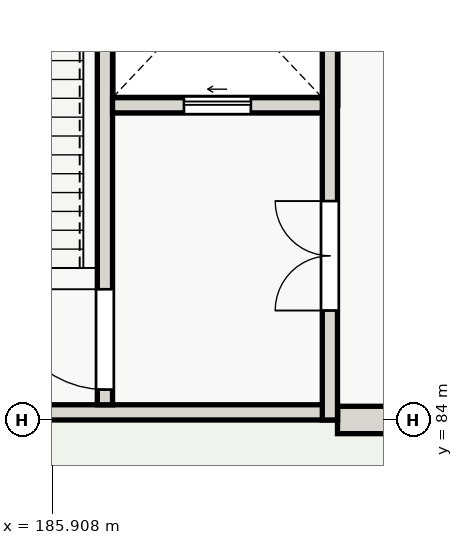
"""IFC4 building model, lengths in metres.
Left out: names, types, materials, properties, quantities, classifications, styles, units other than length and angle.
Written with IfcOpenShell. Run it as: python <this file> out.ifc"""

import sys

from ifc_helpers import new_model, si_unit, direction, frame, frame_2d, origin, place, context, subcontext, project, spatial, rectangle, extrude, element, fill, save


model = new_model("IFC4")
c1 = context("Model", 3, precision=1e-05, world=origin(), true_north=direction((0.0, 1.0)))
c2 = subcontext(c1, "Body", "Model", "MODEL_VIEW")
j1 = project(units=[si_unit("LENGTHUNIT", "METRE"), si_unit("PLANEANGLEUNIT", "RADIAN")], contexts=[c1])
p1 = place(None, origin())
s1 = spatial("IfcSite", under=j1, at=p1, CompositionType="ELEMENT")
p2 = place(p1, origin())
s2 = spatial("IfcBuilding", under=s1, at=p2, CompositionType="ELEMENT")
p3 = place(p2, origin())
s3 = spatial("IfcBuildingStorey", under=s2, at=p3, CompositionType="ELEMENT", Elevation=0.0)
p4 = place(p3, frame((192.0, 84.0, 0.0), z_axis=(0.0, 0.0, 1.0), x_axis=(-1.0, 0.0, 0.0)))
e1 = element("IfcWall", 1, at=p4, inside=s3, PredefinedType="SOLIDWALL", context=c2, shape_type="SweptSolid", body=[
    extrude(rectangle(XDim=1.4, YDim=0.45, at=frame_2d((0.7, 0.0))), origin(), (0.0, 0.0, 1.0), 3.58),
])
p5 = place(p3, frame((186.78, 89.18, -1.6), z_axis=(0.0, 0.0, 1.0), x_axis=(1.0, 0.0, 0.0)))
e2 = element("IfcWall", 2, at=p5, inside=s3, PredefinedType="SHEAR", context=c2, shape_type="SweptSolid", body=[
    extrude(rectangle(XDim=3.7, YDim=0.25, at=frame_2d((1.85, 0.0))), origin(), (0.0, 0.0, 1.0), 1.6),
])
for number, where, z_axis, x_axis in (
    (3, (190.48, 89.18, -1.6), (0.0, 0.0, 1.0), (0.0, 1.0, 0.0)),
    (4, (186.78, 93.08, -1.6), (0.0, 0.0, 1.0), (0.0, -1.0, 0.0)),
):
    element("IfcWall", number, at=place(p3, frame(where, z_axis=z_axis, x_axis=x_axis)), inside=s3, PredefinedType="SHEAR", context=c2, shape_type="SweptSolid", body=[
        extrude(rectangle(XDim=3.9, YDim=0.25, at=frame_2d((1.95, 0.0))), origin(), (0.0, 0.0, 1.0), 1.6),
    ])
p6 = place(p3, frame((190.6, 84.125, 0.0), z_axis=(0.0, 0.0, 1.0), x_axis=(-1.0, 0.0, 0.0)))
e5 = element("IfcWall", 5, at=p6, inside=s3, PredefinedType="SHEAR", context=c2, shape_type="SweptSolid", body=[
    extrude(rectangle(XDim=9.2, YDim=0.25, at=frame_2d((4.6, 0.0))), origin(), (0.0, 0.0, 1.0), 4.2),
])
p7 = place(p6, frame((5.9, 0.0, 0.0)))
e6 = element("IfcOpeningElement", 6, at=p7, cuts=e5, PredefinedType="OPENING", context=c2, shape_type="SweptSolid", body=[
    extrude(rectangle(XDim=1.9, YDim=2.2, at=frame_2d((0.95, 1.1))), frame((0.0, 0.135, 0.0), z_axis=(0.0, -1.0, 0.0), x_axis=(1.0, 0.0, 0.0)), (0.0, 0.0, 1.0), 0.27),
])
p8 = place(p3, frame((190.475, 84.0, 0.0), z_axis=(0.0, 0.0, 1.0), x_axis=(0.0, 1.0, 0.0)))
e7 = element("IfcWall", 7, at=p8, inside=s3, PredefinedType="SHEAR", context=c2, shape_type="SweptSolid", body=[
    extrude(rectangle(XDim=9.2, YDim=0.25, at=frame_2d((4.6, 0.0))), origin(), (0.0, 0.0, 1.0), 4.2),
])
p9 = place(p8, frame((1.8, 0.0, 0.0)))
e8 = element("IfcOpeningElement", 8, at=p9, cuts=e7, PredefinedType="OPENING", context=c2, shape_type="SweptSolid", body=[
    extrude(rectangle(XDim=1.8, YDim=2.15, at=frame_2d((0.9, 1.075))), frame((0.0, 0.135, 0.0), z_axis=(0.0, -1.0, 0.0), x_axis=(1.0, 0.0, 0.0)), (0.0, 0.0, 1.0), 0.27),
])
p10 = place(p3, frame((186.775, 84.25, 0.0), z_axis=(0.0, 0.0, 1.0), x_axis=(0.0, 1.0, 0.0)))
e9 = element("IfcWall", 9, at=p10, inside=s3, PredefinedType="SHEAR", context=c2, shape_type="SweptSolid", body=[
    extrude(rectangle(XDim=8.7, YDim=0.25, at=frame_2d((4.35, 0.0))), origin(), (0.0, 0.0, 1.0), 4.2),
])
p11 = place(p10, frame((0.25, 0.0, 0.0)))
e10 = element("IfcOpeningElement", 10, at=p11, cuts=e9, PredefinedType="OPENING", context=c2, shape_type="SweptSolid", body=[
    extrude(rectangle(XDim=1.65, YDim=2.1, at=frame_2d((0.825, 1.05))), frame((0.0, 0.135, 0.0), z_axis=(0.0, -1.0, 0.0), x_axis=(1.0, 0.0, 0.0)), (0.0, 0.0, 1.0), 0.27),
])
p12 = place(p3, frame((186.9, 89.175, 0.0), z_axis=(0.0, 0.0, 1.0), x_axis=(1.0, 0.0, 0.0)))
e11 = element("IfcWall", 11, at=p12, inside=s3, PredefinedType="SHEAR", context=c2, shape_type="SweptSolid", body=[
    extrude(rectangle(XDim=3.45, YDim=0.25, at=frame_2d((1.725, 0.0))), origin(), (0.0, 0.0, 1.0), 4.2),
])
p13 = place(p12, frame((1.175, 0.0, 0.0)))
e12 = element("IfcOpeningElement", 12, at=p13, cuts=e11, PredefinedType="OPENING", context=c2, shape_type="SweptSolid", body=[
    extrude(rectangle(XDim=1.1, YDim=2.1, at=frame_2d((0.55, 1.05))), frame((0.0, 0.135, 0.0), z_axis=(0.0, -1.0, 0.0), x_axis=(1.0, 0.0, 0.0)), (0.0, 0.0, 1.0), 0.27),
])
p14 = place(p9, origin())
e13 = element("IfcDoor", 13, at=p14, inside=s3, OperationType="DOUBLE_DOOR_SINGLE_SWING", PredefinedType="DOOR", context=c2, shape_type="SweptSolid", body=[
    extrude(rectangle(XDim=1.8, YDim=2.15, at=frame_2d((0.9, 1.075))), frame((0.0, 0.025, 0.0), z_axis=(0.0, -1.0, 0.0), x_axis=(1.0, 0.0, 0.0)), (0.0, 0.0, 1.0), 0.05),
])
fill(e8, e13)
p15 = place(p11, origin())
e14 = element("IfcDoor", 14, at=p15, inside=s3, OperationType="SINGLE_SWING_RIGHT", PredefinedType="DOOR", context=c2, shape_type="SweptSolid", body=[
    extrude(rectangle(XDim=1.65, YDim=2.1, at=frame_2d((0.825, 1.05))), frame((0.0, 0.025, 0.0), z_axis=(0.0, -1.0, 0.0), x_axis=(1.0, 0.0, 0.0)), (0.0, 0.0, 1.0), 0.05),
])
fill(e10, e14)
p16 = place(p13, origin())
e15 = element("IfcDoor", 15, at=p16, inside=s3, OperationType="SLIDING_TO_LEFT", PredefinedType="DOOR", context=c2, shape_type="SweptSolid", body=[
    extrude(rectangle(XDim=1.1, YDim=2.1, at=frame_2d((0.55, 1.05))), frame((0.0, 0.025, 0.0), z_axis=(0.0, -1.0, 0.0), x_axis=(1.0, 0.0, 0.0)), (0.0, 0.0, 1.0), 0.05),
])
fill(e12, e15)
save(model, sys.argv[1])
